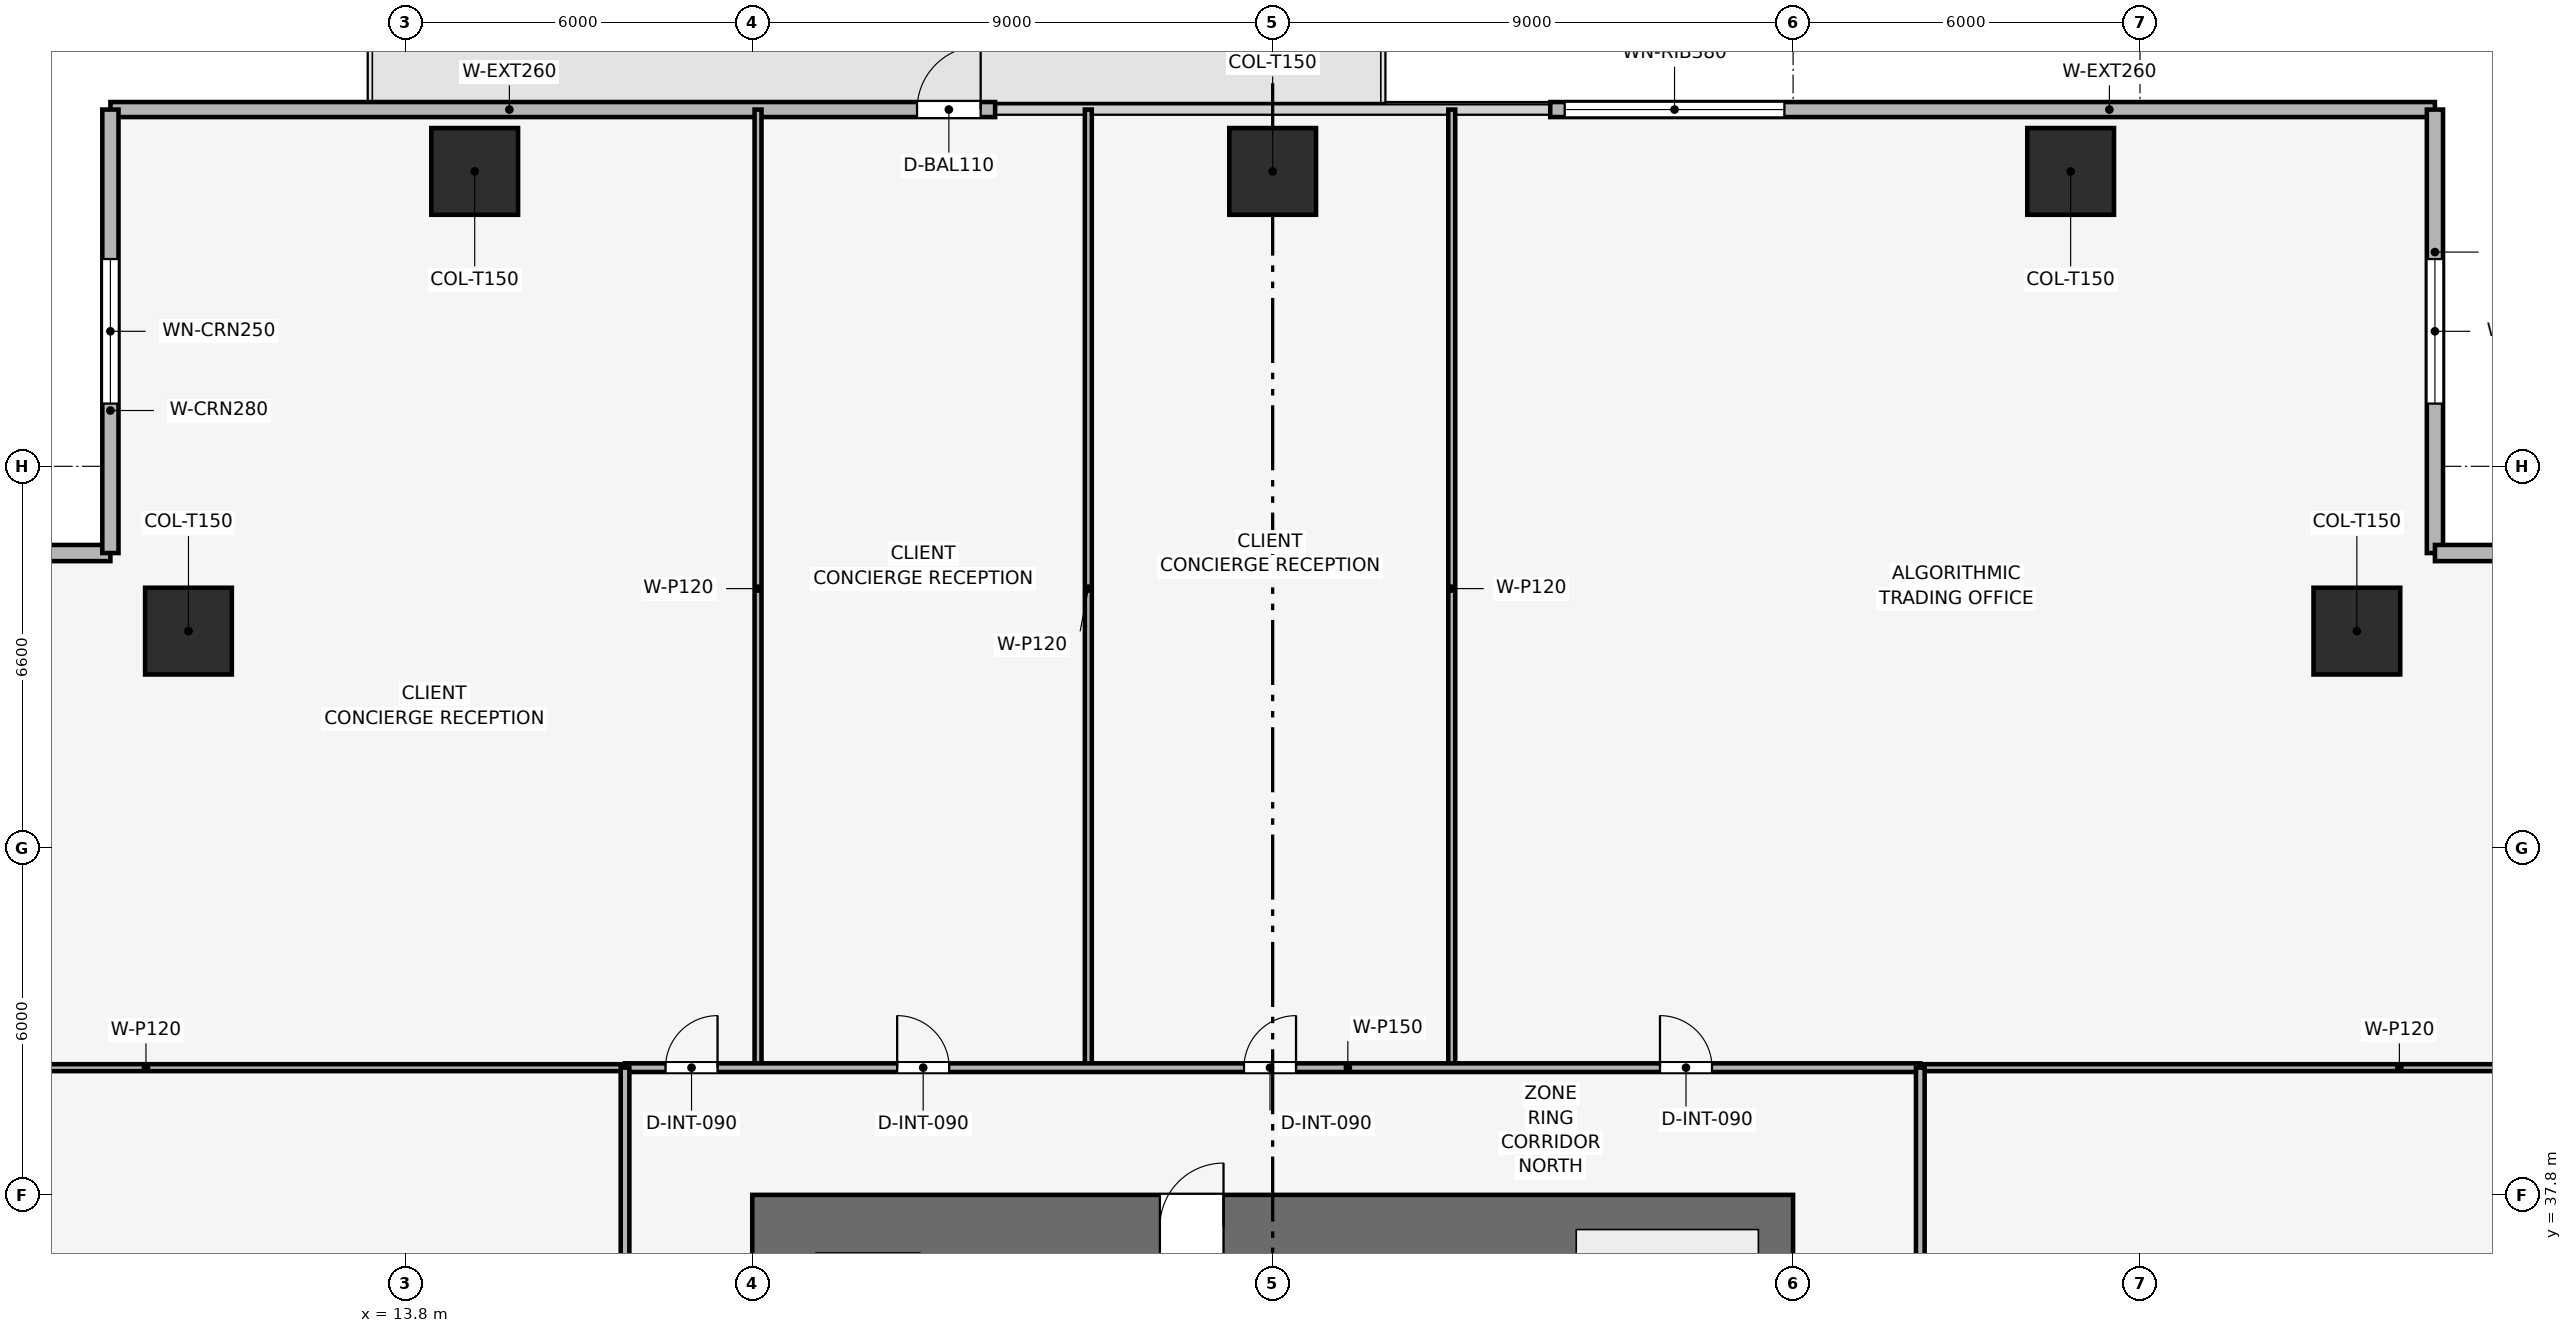
"""IFC4 building model, lengths in metres.
Left out: names, types, materials, properties, quantities, classifications, styles, units other than length and angle.
Written with IfcOpenShell. Run it as: python <this file> out.ifc"""

import sys

from ifc_helpers import new_model, si_unit, direction, frame, frame_2d, origin, origin_2d, place, context, subcontext, project, spatial, rectangle, extrude, element, fill, save


model = new_model("IFC4")
c1 = context("Model", 3, precision=1e-05, world=origin(), true_north=direction((0.0, 1.0)))
c2 = subcontext(c1, "Body", "Model", "MODEL_VIEW")
j1 = project(units=[si_unit("LENGTHUNIT", "METRE"), si_unit("PLANEANGLEUNIT", "RADIAN")], contexts=[c1])
p1 = place(None, origin())
s1 = spatial("IfcSite", under=j1, at=p1, CompositionType="ELEMENT")
p2 = place(p1, origin())
s2 = spatial("IfcBuilding", under=s1, at=p2, CompositionType="ELEMENT")
p3 = place(p2, frame((0.0, 0.0, 45.6)))
s3 = spatial("IfcBuildingStorey", under=s2, at=p3, CompositionType="ELEMENT", Elevation=45.6)
p4 = place(p3, frame((19.8, 37.25, 0.0), z_axis=(0.0, 0.0, 1.0), x_axis=(1.0, 0.0, 0.0)))
e1 = element("IfcWall", 1, at=p4, inside=s3, PredefinedType="SHEAR", context=c2, shape_type="SweptSolid", body=[
    extrude(rectangle(XDim=18.0, YDim=1.1, at=frame_2d((9.0, 0.0))), origin(), (0.0, 0.0, 1.0), 3.9),
])
p5 = place(p4, frame((7.05, 0.0, 0.0)))
e2 = element("IfcOpeningElement", 2, at=p5, cuts=e1, PredefinedType="OPENING", context=c2, shape_type="SweptSolid", body=[
    extrude(rectangle(XDim=1.1, YDim=2.15, at=frame_2d((0.55, 1.075))), frame((0.0, 0.56, 0.0), z_axis=(0.0, -1.0, 0.0), x_axis=(1.0, 0.0, 0.0)), (0.0, 0.0, 1.0), 1.12),
])
for number, where, z_axis, x_axis in (
    (3, (42.6, 55.5, 0.003), (0.0, 0.0, 1.0), (1.0, 0.0, 0.0)),
    (4, (28.8, 55.5, 0.003), (0.0, 0.0, 1.0), (1.0, 0.0, 0.0)),
    (5, (15.0, 55.5, 0.003), (0.0, 0.0, 1.0), (1.0, 0.0, 0.0)),
    (6, (47.55, 47.55, 0.003), (0.0, 0.0, 1.0), (1.0, 0.0, 0.0)),
    (7, (10.05, 47.55, 0.003), (0.0, 0.0, 1.0), (1.0, 0.0, 0.0)),
):
    element("IfcColumn", number, at=place(p3, frame(where, z_axis=z_axis, x_axis=x_axis)), inside=s3, PredefinedType="COLUMN", context=c2, shape_type="SweptSolid", body=[
        extrude(rectangle(XDim=1.5, YDim=1.5, at=origin_2d()), origin(), (0.0, 0.0, 1.0), 3.644),
    ])
p6 = place(p3, frame((8.7, 56.57, 0.0), z_axis=(0.0, 0.0, 1.0), x_axis=(1.0, 0.0, 0.0)))
e8 = element("IfcWall", 8, at=p6, inside=s3, PredefinedType="SOLIDWALL", context=c2, shape_type="SweptSolid", body=[
    extrude(rectangle(XDim=15.3, YDim=0.26, at=frame_2d((7.65, 0.0))), origin(), (0.0, 0.0, 1.0), 3.65),
])
p7 = place(p6, frame((13.95, 0.0, 0.0)))
e9 = element("IfcOpeningElement", 9, at=p7, cuts=e8, PredefinedType="OPENING", context=c2, shape_type="SweptSolid", body=[
    extrude(rectangle(XDim=1.1, YDim=2.2, at=frame_2d((0.55, 1.1))), frame((0.0, 0.14, 0.0), z_axis=(0.0, -1.0, 0.0), x_axis=(1.0, 0.0, 0.0)), (0.0, 0.0, 1.0), 0.28),
])
p8 = place(p3, frame((33.6, 56.57, 0.0), z_axis=(0.0, 0.0, 1.0), x_axis=(1.0, 0.0, 0.0)))
e10 = element("IfcWall", 10, at=p8, inside=s3, PredefinedType="SOLIDWALL", context=c2, shape_type="SweptSolid", body=[
    extrude(rectangle(XDim=15.3, YDim=0.26, at=frame_2d((7.65, 0.0))), origin(), (0.0, 0.0, 1.0), 3.65),
])
p9 = place(p8, frame((0.25, 0.0, 0.9)))
e11 = element("IfcOpeningElement", 11, at=p9, cuts=e10, PredefinedType="OPENING", context=c2, shape_type="SweptSolid", body=[
    extrude(rectangle(XDim=3.8, YDim=1.9, at=frame_2d((1.9, 0.95))), frame((0.0, 0.14, 0.0), z_axis=(0.0, -1.0, 0.0), x_axis=(1.0, 0.0, 0.0)), (0.0, 0.0, 1.0), 0.28),
])
p10 = place(p3, frame((1.03, 48.9, 0.0), z_axis=(0.0, 0.0, 1.0), x_axis=(1.0, 0.0, 0.0)))
e12 = element("IfcWall", 12, at=p10, inside=s3, PredefinedType="SOLIDWALL", context=c2, shape_type="SweptSolid", body=[
    extrude(rectangle(XDim=7.67, YDim=0.28, at=frame_2d((3.835, 0.0))), origin(), (0.0, 0.0, 1.0), 3.65),
])
p11 = place(p10, frame((2.585, 0.0, 0.9)))
e13 = element("IfcOpeningElement", 13, at=p11, cuts=e12, PredefinedType="OPENING", context=c2, shape_type="SweptSolid", body=[
    extrude(rectangle(XDim=2.5, YDim=1.9, at=frame_2d((1.25, 0.95))), frame((0.0, 0.15, 0.0), z_axis=(0.0, -1.0, 0.0), x_axis=(1.0, 0.0, 0.0)), (0.0, 0.0, 1.0), 0.3),
])
p12 = place(p3, frame((8.7, 48.9, 0.0), z_axis=(0.0, 0.0, 1.0), x_axis=(0.0, 1.0, 0.0)))
e14 = element("IfcWall", 14, at=p12, inside=s3, PredefinedType="SOLIDWALL", context=c2, shape_type="SweptSolid", body=[
    extrude(rectangle(XDim=7.67, YDim=0.28, at=frame_2d((3.835, 0.0))), origin(), (0.0, 0.0, 1.0), 3.65),
])
p13 = place(p12, frame((2.585, 0.0, 0.9)))
e15 = element("IfcOpeningElement", 15, at=p13, cuts=e14, PredefinedType="OPENING", context=c2, shape_type="SweptSolid", body=[
    extrude(rectangle(XDim=2.5, YDim=1.9, at=frame_2d((1.25, 0.95))), frame((0.0, 0.15, 0.0), z_axis=(0.0, -1.0, 0.0), x_axis=(1.0, 0.0, 0.0)), (0.0, 0.0, 1.0), 0.3),
])
p14 = place(p3, frame((48.9, 56.57, 0.0), z_axis=(0.0, 0.0, 1.0), x_axis=(0.0, -1.0, 0.0)))
e16 = element("IfcWall", 16, at=p14, inside=s3, PredefinedType="SOLIDWALL", context=c2, shape_type="SweptSolid", body=[
    extrude(rectangle(XDim=7.67, YDim=0.28, at=frame_2d((3.835, 0.0))), origin(), (0.0, 0.0, 1.0), 3.65),
])
p15 = place(p14, frame((2.585, 0.0, 0.9)))
e17 = element("IfcOpeningElement", 17, at=p15, cuts=e16, PredefinedType="OPENING", context=c2, shape_type="SweptSolid", body=[
    extrude(rectangle(XDim=2.5, YDim=1.9, at=frame_2d((1.25, 0.95))), frame((0.0, 0.15, 0.0), z_axis=(0.0, -1.0, 0.0), x_axis=(1.0, 0.0, 0.0)), (0.0, 0.0, 1.0), 0.3),
])
p16 = place(p3, frame((48.9, 48.9, 0.0), z_axis=(0.0, 0.0, 1.0), x_axis=(1.0, 0.0, 0.0)))
e18 = element("IfcWall", 18, at=p16, inside=s3, PredefinedType="SOLIDWALL", context=c2, shape_type="SweptSolid", body=[
    extrude(rectangle(XDim=7.67, YDim=0.28, at=frame_2d((3.835, 0.0))), origin(), (0.0, 0.0, 1.0), 3.65),
])
p17 = place(p16, frame((2.585, 0.0, 0.9)))
e19 = element("IfcOpeningElement", 19, at=p17, cuts=e18, PredefinedType="OPENING", context=c2, shape_type="SweptSolid", body=[
    extrude(rectangle(XDim=2.5, YDim=1.9, at=frame_2d((1.25, 0.95))), frame((0.0, 0.15, 0.0), z_axis=(0.0, -1.0, 0.0), x_axis=(1.0, 0.0, 0.0)), (0.0, 0.0, 1.0), 0.3),
])
for number, where, z_axis, x_axis in (
    (20, (19.9, 40.0, 0.0), (0.0, 0.0, 1.0), (0.0, 1.0, 0.0)),
    (21, (25.612, 40.0, 0.0), (0.0, 0.0, 1.0), (0.0, 1.0, 0.0)),
    (22, (31.897, 40.0, 0.0), (0.0, 0.0, 1.0), (0.0, 1.0, 0.0)),
    (23, (1.03, 40.0, 0.0), (0.0, 0.0, 1.0), (1.0, 0.0, 0.0)),
    (24, (40.0, 40.0, 0.0), (0.0, 0.0, 1.0), (1.0, 0.0, 0.0)),
):
    element("IfcWall", number, at=place(p3, frame(where, z_axis=z_axis, x_axis=x_axis)), inside=s3, PredefinedType="PARTITIONING", context=c2, shape_type="SweptSolid", body=[
        extrude(rectangle(XDim=16.57, YDim=0.12, at=frame_2d((8.285, 0.0))), origin(), (0.0, 0.0, 1.0), 2.935),
    ])
p18 = place(p3, frame((17.6, 40.0, 0.0), z_axis=(0.0, 0.0, 1.0), x_axis=(1.0, 0.0, 0.0)))
e25 = element("IfcWall", 25, at=p18, inside=s3, PredefinedType="PARTITIONING", context=c2, shape_type="SweptSolid", body=[
    extrude(rectangle(XDim=22.4, YDim=0.15, at=frame_2d((11.2, 0.0))), origin(), (0.0, 0.0, 1.0), 3.085),
])
p19 = place(p18, frame((0.7, 0.0, 0.0)))
e26 = element("IfcOpeningElement", 26, at=p19, cuts=e25, PredefinedType="OPENING", context=c2, shape_type="SweptSolid", body=[
    extrude(rectangle(XDim=0.9, YDim=2.1, at=frame_2d((0.45, 1.05))), frame((0.0, 0.085, 0.0), z_axis=(0.0, -1.0, 0.0), x_axis=(1.0, 0.0, 0.0)), (0.0, 0.0, 1.0), 0.17),
])
p20 = place(p18, frame((4.706, 0.0, 0.0)))
e27 = element("IfcOpeningElement", 27, at=p20, cuts=e25, PredefinedType="OPENING", context=c2, shape_type="SweptSolid", body=[
    extrude(rectangle(XDim=0.9, YDim=2.1, at=frame_2d((0.45, 1.05))), frame((0.0, 0.085, 0.0), z_axis=(0.0, -1.0, 0.0), x_axis=(1.0, 0.0, 0.0)), (0.0, 0.0, 1.0), 0.17),
])
p21 = place(p18, frame((10.704, 0.0, 0.0)))
e28 = element("IfcOpeningElement", 28, at=p21, cuts=e25, PredefinedType="OPENING", context=c2, shape_type="SweptSolid", body=[
    extrude(rectangle(XDim=0.9, YDim=2.1, at=frame_2d((0.45, 1.05))), frame((0.0, 0.085, 0.0), z_axis=(0.0, -1.0, 0.0), x_axis=(1.0, 0.0, 0.0)), (0.0, 0.0, 1.0), 0.17),
])
p22 = place(p18, frame((17.898, 0.0, 0.0)))
e29 = element("IfcOpeningElement", 29, at=p22, cuts=e25, PredefinedType="OPENING", context=c2, shape_type="SweptSolid", body=[
    extrude(rectangle(XDim=0.9, YDim=2.1, at=frame_2d((0.45, 1.05))), frame((0.0, 0.085, 0.0), z_axis=(0.0, -1.0, 0.0), x_axis=(1.0, 0.0, 0.0)), (0.0, 0.0, 1.0), 0.17),
])
p23 = place(p3, frame((17.6, 17.6, 0.0), z_axis=(0.0, 0.0, 1.0), x_axis=(0.0, 1.0, 0.0)))
e30 = element("IfcWall", 30, at=p23, inside=s3, PredefinedType="PARTITIONING", context=c2, shape_type="SweptSolid", body=[
    extrude(rectangle(XDim=22.4, YDim=0.15, at=frame_2d((11.2, 0.0))), origin(), (0.0, 0.0, 1.0), 3.085),
])
p24 = place(p23, frame((0.778, 0.0, 0.0)))
e31 = element("IfcOpeningElement", 31, at=p24, cuts=e30, PredefinedType="OPENING", context=c2, shape_type="SweptSolid", body=[
    extrude(rectangle(XDim=0.9, YDim=2.1, at=frame_2d((0.45, 1.05))), frame((0.0, 0.085, 0.0), z_axis=(0.0, -1.0, 0.0), x_axis=(1.0, 0.0, 0.0)), (0.0, 0.0, 1.0), 0.17),
])
p25 = place(p23, frame((6.372, 0.0, 0.0)))
e32 = element("IfcOpeningElement", 32, at=p25, cuts=e30, PredefinedType="OPENING", context=c2, shape_type="SweptSolid", body=[
    extrude(rectangle(XDim=0.9, YDim=2.1, at=frame_2d((0.45, 1.05))), frame((0.0, 0.085, 0.0), z_axis=(0.0, -1.0, 0.0), x_axis=(1.0, 0.0, 0.0)), (0.0, 0.0, 1.0), 0.17),
])
p26 = place(p23, frame((16.343, 0.0, 0.0)))
e33 = element("IfcOpeningElement", 33, at=p26, cuts=e30, PredefinedType="OPENING", context=c2, shape_type="SweptSolid", body=[
    extrude(rectangle(XDim=0.9, YDim=2.1, at=frame_2d((0.45, 1.05))), frame((0.0, 0.085, 0.0), z_axis=(0.0, -1.0, 0.0), x_axis=(1.0, 0.0, 0.0)), (0.0, 0.0, 1.0), 0.17),
])
p27 = place(p3, frame((40.0, 17.6, 0.0), z_axis=(0.0, 0.0, 1.0), x_axis=(0.0, 1.0, 0.0)))
e34 = element("IfcWall", 34, at=p27, inside=s3, PredefinedType="PARTITIONING", context=c2, shape_type="SweptSolid", body=[
    extrude(rectangle(XDim=22.4, YDim=0.15, at=frame_2d((11.2, 0.0))), origin(), (0.0, 0.0, 1.0), 3.085),
])
p28 = place(p27, frame((1.4, 0.0, 0.0)))
e35 = element("IfcOpeningElement", 35, at=p28, cuts=e34, PredefinedType="OPENING", context=c2, shape_type="SweptSolid", body=[
    extrude(rectangle(XDim=0.9, YDim=2.1, at=frame_2d((0.45, 1.05))), frame((0.0, 0.085, 0.0), z_axis=(0.0, -1.0, 0.0), x_axis=(1.0, 0.0, 0.0)), (0.0, 0.0, 1.0), 0.17),
])
p29 = place(p27, frame((4.65, 0.0, 0.0)))
e36 = element("IfcOpeningElement", 36, at=p29, cuts=e34, PredefinedType="OPENING", context=c2, shape_type="SweptSolid", body=[
    extrude(rectangle(XDim=0.9, YDim=2.1, at=frame_2d((0.45, 1.05))), frame((0.0, 0.085, 0.0), z_axis=(0.0, -1.0, 0.0), x_axis=(1.0, 0.0, 0.0)), (0.0, 0.0, 1.0), 0.17),
])
p30 = place(p27, frame((7.55, 0.0, 0.0)))
e37 = element("IfcOpeningElement", 37, at=p30, cuts=e34, PredefinedType="OPENING", context=c2, shape_type="SweptSolid", body=[
    extrude(rectangle(XDim=0.9, YDim=2.1, at=frame_2d((0.45, 1.05))), frame((0.0, 0.085, 0.0), z_axis=(0.0, -1.0, 0.0), x_axis=(1.0, 0.0, 0.0)), (0.0, 0.0, 1.0), 0.17),
])
p31 = place(p27, frame((10.3, 0.0, 0.0)))
e38 = element("IfcOpeningElement", 38, at=p31, cuts=e34, PredefinedType="OPENING", context=c2, shape_type="SweptSolid", body=[
    extrude(rectangle(XDim=0.95, YDim=2.1, at=frame_2d((0.475, 1.05))), frame((0.0, 0.085, 0.0), z_axis=(0.0, -1.0, 0.0), x_axis=(1.0, 0.0, 0.0)), (0.0, 0.0, 1.0), 0.17),
])
p32 = place(p27, frame((16.8, 0.0, 0.0)))
e39 = element("IfcOpeningElement", 39, at=p32, cuts=e34, PredefinedType="OPENING", context=c2, shape_type="SweptSolid", body=[
    extrude(rectangle(XDim=0.9, YDim=2.1, at=frame_2d((0.45, 1.05))), frame((0.0, 0.085, 0.0), z_axis=(0.0, -1.0, 0.0), x_axis=(1.0, 0.0, 0.0)), (0.0, 0.0, 1.0), 0.17),
])
p33 = place(p7, origin())
e40 = element("IfcDoor", 40, at=p33, inside=s3, OperationType="SINGLE_SWING_RIGHT", PredefinedType="DOOR", context=c2, shape_type="SweptSolid", body=[
    extrude(rectangle(XDim=1.1, YDim=2.2, at=frame_2d((0.55, 1.1))), frame((0.0, 0.025, 0.0), z_axis=(0.0, -1.0, 0.0), x_axis=(1.0, 0.0, 0.0)), (0.0, 0.0, 1.0), 0.05),
])
fill(e9, e40)
p34 = place(p9, origin())
e41 = element("IfcWindow", 41, at=p34, inside=s3, PartitioningType="SINGLE_PANEL", PredefinedType="WINDOW", context=c2, shape_type="SweptSolid", body=[
    extrude(rectangle(XDim=3.8, YDim=1.9, at=frame_2d((1.9, 0.95))), frame((0.0, 0.03, 0.0), z_axis=(0.0, -1.0, 0.0), x_axis=(1.0, 0.0, 0.0)), (0.0, 0.0, 1.0), 0.06),
])
fill(e11, e41)
p35 = place(p13, origin())
e42 = element("IfcWindow", 42, at=p35, inside=s3, PartitioningType="SINGLE_PANEL", PredefinedType="WINDOW", context=c2, shape_type="SweptSolid", body=[
    extrude(rectangle(XDim=2.5, YDim=1.9, at=frame_2d((1.25, 0.95))), frame((0.0, 0.03, 0.0), z_axis=(0.0, -1.0, 0.0), x_axis=(1.0, 0.0, 0.0)), (0.0, 0.0, 1.0), 0.06),
])
fill(e15, e42)
p36 = place(p15, origin())
e43 = element("IfcWindow", 43, at=p36, inside=s3, PartitioningType="SINGLE_PANEL", PredefinedType="WINDOW", context=c2, shape_type="SweptSolid", body=[
    extrude(rectangle(XDim=2.5, YDim=1.9, at=frame_2d((1.25, 0.95))), frame((0.0, 0.03, 0.0), z_axis=(0.0, -1.0, 0.0), x_axis=(1.0, 0.0, 0.0)), (0.0, 0.0, 1.0), 0.06),
])
fill(e17, e43)
p37 = place(p19, origin())
e44 = element("IfcDoor", 44, at=p37, inside=s3, OperationType="SINGLE_SWING_RIGHT", PredefinedType="DOOR", context=c2, shape_type="SweptSolid", body=[
    extrude(rectangle(XDim=0.9, YDim=2.1, at=frame_2d((0.45, 1.05))), frame((0.0, 0.025, 0.0), z_axis=(0.0, -1.0, 0.0), x_axis=(1.0, 0.0, 0.0)), (0.0, 0.0, 1.0), 0.05),
])
fill(e26, e44)
p38 = place(p20, origin())
e45 = element("IfcDoor", 45, at=p38, inside=s3, OperationType="SINGLE_SWING_LEFT", PredefinedType="DOOR", context=c2, shape_type="SweptSolid", body=[
    extrude(rectangle(XDim=0.9, YDim=2.1, at=frame_2d((0.45, 1.05))), frame((0.0, 0.025, 0.0), z_axis=(0.0, -1.0, 0.0), x_axis=(1.0, 0.0, 0.0)), (0.0, 0.0, 1.0), 0.05),
])
fill(e27, e45)
p39 = place(p21, origin())
e46 = element("IfcDoor", 46, at=p39, inside=s3, OperationType="SINGLE_SWING_RIGHT", PredefinedType="DOOR", context=c2, shape_type="SweptSolid", body=[
    extrude(rectangle(XDim=0.9, YDim=2.1, at=frame_2d((0.45, 1.05))), frame((0.0, 0.025, 0.0), z_axis=(0.0, -1.0, 0.0), x_axis=(1.0, 0.0, 0.0)), (0.0, 0.0, 1.0), 0.05),
])
fill(e28, e46)
p40 = place(p22, origin())
e47 = element("IfcDoor", 47, at=p40, inside=s3, OperationType="SINGLE_SWING_LEFT", PredefinedType="DOOR", context=c2, shape_type="SweptSolid", body=[
    extrude(rectangle(XDim=0.9, YDim=2.1, at=frame_2d((0.45, 1.05))), frame((0.0, 0.025, 0.0), z_axis=(0.0, -1.0, 0.0), x_axis=(1.0, 0.0, 0.0)), (0.0, 0.0, 1.0), 0.05),
])
fill(e29, e47)
p41 = place(p5, origin())
e48 = element("IfcDoor", 48, at=p41, inside=s3, OperationType="SINGLE_SWING_RIGHT", PredefinedType="DOOR", context=c2, shape_type="SweptSolid", body=[
    extrude(rectangle(XDim=1.1, YDim=2.15, at=frame_2d((0.55, 1.075))), frame((0.0, 0.025, 0.0), z_axis=(0.0, -1.0, 0.0), x_axis=(1.0, 0.0, 0.0)), (0.0, 0.0, 1.0), 0.05),
])
fill(e2, e48)
save(model, sys.argv[1])
